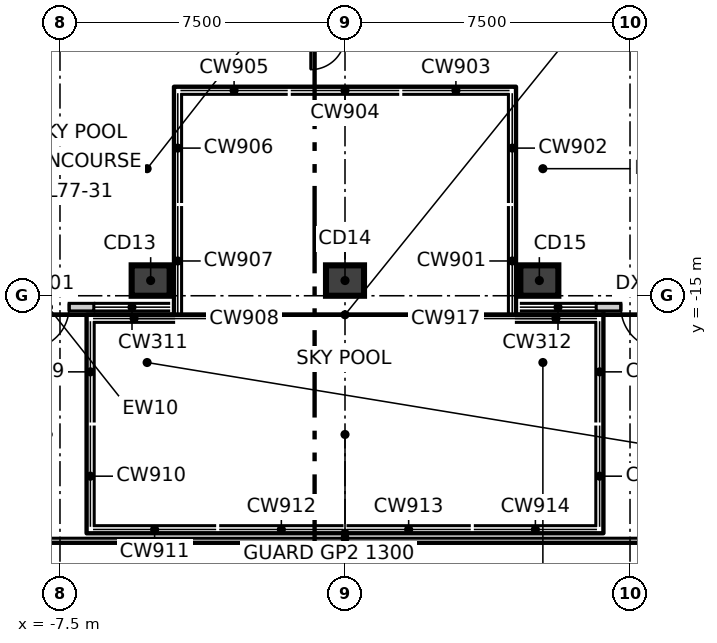
"""IFC4 building model, lengths in metres.
Left out: names, types, materials, properties, quantities, classifications, styles, units other than length and angle.
Written with IfcOpenShell. Run it as: python <this file> out.ifc"""

import sys

from ifc_helpers import new_model, si_unit, direction, frame, frame_2d, origin, origin_2d, place, context, subcontext, project, spatial, rectangle, extrude, element, fill, save


model = new_model("IFC4")
c1 = context("Model", 3, precision=1e-05, world=origin(), true_north=direction((0.0, 1.0)))
c2 = subcontext(c1, "Body", "Model", "MODEL_VIEW")
j1 = project(units=[si_unit("LENGTHUNIT", "METRE"), si_unit("PLANEANGLEUNIT", "RADIAN")], contexts=[c1])
p1 = place(None, origin())
s1 = spatial("IfcSite", under=j1, at=p1, CompositionType="ELEMENT")
p2 = place(p1, origin())
s2 = spatial("IfcBuilding", under=s1, at=p2, CompositionType="ELEMENT")
p3 = place(p2, frame((0.0, 0.0, 322.3)))
s3 = spatial("IfcBuildingStorey", under=s2, at=p3, CompositionType="ELEMENT", Elevation=322.3)
for number, where, z_axis, x_axis in (
    (1, (-5.114, -14.6, -0.3), (0.0, 0.0, 1.0), (1.0, 0.0, 0.0)),
    (2, (0.0, -14.6, -0.3), (0.0, 0.0, 1.0), (1.0, 0.0, 0.0)),
    (3, (5.114, -14.6, -0.3), (0.0, 0.0, 1.0), (1.0, 0.0, 0.0)),
):
    element("IfcColumn", number, at=place(p3, frame(where, z_axis=z_axis, x_axis=x_axis)), inside=s3, PredefinedType="COLUMN", context=c2, shape_type="SweptSolid", body=[
        extrude(rectangle(XDim=1.0, YDim=0.8, at=origin_2d()), origin(), (0.0, 0.0, 1.0), 5.35),
    ])
p4 = place(p3, frame((-9.01, -15.3, 0.0), z_axis=(0.0, 0.0, 1.0), x_axis=(1.0, 0.0, 0.0)))
e4 = element("IfcWall", 4, at=p4, inside=s3, PredefinedType="ELEMENTEDWALL", context=c2, shape_type="SweptSolid", body=[
    extrude(rectangle(XDim=2.4, YDim=0.2, at=frame_2d((1.2, 0.0))), origin(), (0.0, 0.0, 1.0), 5.05),
])
p5 = place(p4, frame((0.65, 0.0, 0.0)))
e5 = element("IfcOpeningElement", 5, at=p5, cuts=e4, PredefinedType="OPENING", context=c2, shape_type="SweptSolid", body=[
    extrude(rectangle(XDim=1.1, YDim=2.4, at=frame_2d((0.55, 1.2))), frame((0.0, 0.11, 0.0), z_axis=(0.0, -1.0, 0.0), x_axis=(1.0, 0.0, 0.0)), (0.0, 0.0, 1.0), 0.22),
])
p6 = place(p3, frame((6.61, -15.3, 0.0), z_axis=(0.0, 0.0, 1.0), x_axis=(1.0, 0.0, 0.0)))
e6 = element("IfcWall", 6, at=p6, inside=s3, PredefinedType="ELEMENTEDWALL", context=c2, shape_type="SweptSolid", body=[
    extrude(rectangle(XDim=2.4, YDim=0.2, at=frame_2d((1.2, 0.0))), origin(), (0.0, 0.0, 1.0), 5.05),
])
p7 = place(p6, frame((0.65, 0.0, 0.0)))
e7 = element("IfcOpeningElement", 7, at=p7, cuts=e6, PredefinedType="OPENING", context=c2, shape_type="SweptSolid", body=[
    extrude(rectangle(XDim=1.1, YDim=2.4, at=frame_2d((0.55, 1.2))), frame((0.0, 0.11, 0.0), z_axis=(0.0, -1.0, 0.0), x_axis=(1.0, 0.0, 0.0)), (0.0, 0.0, 1.0), 0.22),
])
p8 = place(p5, frame((1.1, 0.0, 0.0), z_axis=(0.0, 0.0, 1.0), x_axis=(-1.0, 0.0, 0.0)))
e8 = element("IfcDoor", 8, at=p8, inside=s3, OperationType="SINGLE_SWING_RIGHT", PredefinedType="DOOR", context=c2, shape_type="SweptSolid", body=[
    extrude(rectangle(XDim=1.1, YDim=2.4, at=frame_2d((0.55, 1.2))), frame((0.0, 0.025, 0.0), z_axis=(0.0, -1.0, 0.0), x_axis=(1.0, 0.0, 0.0)), (0.0, 0.0, 1.0), 0.05),
])
fill(e5, e8)
p9 = place(p7, frame((1.1, 0.0, 0.0), z_axis=(0.0, 0.0, 1.0), x_axis=(-1.0, 0.0, 0.0)))
e9 = element("IfcDoor", 9, at=p9, inside=s3, OperationType="SINGLE_SWING_LEFT", PredefinedType="DOOR", context=c2, shape_type="SweptSolid", body=[
    extrude(rectangle(XDim=1.1, YDim=2.4, at=frame_2d((0.55, 1.2))), frame((0.0, 0.025, 0.0), z_axis=(0.0, -1.0, 0.0), x_axis=(1.0, 0.0, 0.0)), (0.0, 0.0, 1.0), 0.05),
])
fill(e7, e9)
save(model, sys.argv[1])
